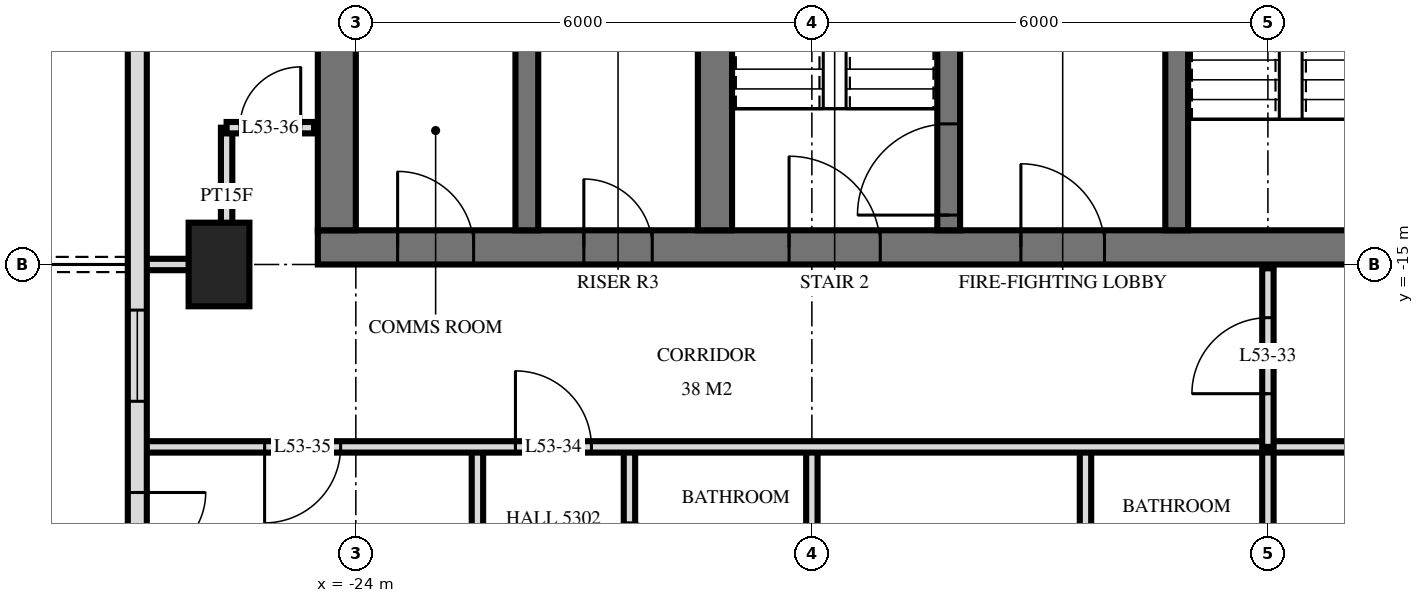
"""IFC4 building model, lengths in metres.
Left out: names, types, materials, properties, quantities, classifications, styles, units other than length and angle.
Written with IfcOpenShell. Run it as: python <this file> out.ifc"""

import sys

from ifc_helpers import new_model, si_unit, direction, frame, frame_2d, origin, origin_2d, place, context, subcontext, project, spatial, rectangle, extrude, element, fill, save


model = new_model("IFC4")
c1 = context("Model", 3, precision=1e-05, world=origin(), true_north=direction((0.0, 1.0)))
c2 = subcontext(c1, "Body", "Model", "MODEL_VIEW")
j1 = project(units=[si_unit("LENGTHUNIT", "METRE"), si_unit("PLANEANGLEUNIT", "RADIAN")], contexts=[c1])
p1 = place(None, origin())
s1 = spatial("IfcSite", under=j1, at=p1, CompositionType="ELEMENT")
p2 = place(p1, origin())
s2 = spatial("IfcBuilding", under=s1, at=p2, CompositionType="ELEMENT")
p3 = place(p2, frame((0.0, 0.0, 204.6)))
s3 = spatial("IfcBuildingStorey", under=s2, at=p3, CompositionType="ELEMENT", Elevation=204.6)
p4 = place(p3, frame((-25.8, -15.0, 0.0), z_axis=(0.0, 0.0, 1.0), x_axis=(0.0, 1.0, 0.0)))
e1 = element("IfcColumn", 1, at=p4, inside=s3, PredefinedType="COLUMN", context=c2, shape_type="SweptSolid", body=[
    extrude(rectangle(XDim=1.1, YDim=0.8, at=origin_2d()), origin(), (0.0, 0.0, 1.0), 3.5),
])
p5 = place(p3, frame((-24.5, -14.775, 0.0), z_axis=(0.0, 0.0, 1.0), x_axis=(1.0, 0.0, 0.0)))
e2 = element("IfcWall", 2, at=p5, inside=s3, PredefinedType="SHEAR", context=c2, shape_type="SweptSolid", body=[
    extrude(rectangle(XDim=14.5, YDim=0.45, at=frame_2d((7.25, 0.0))), origin(), (0.0, 0.0, 1.0), 3.5),
])
p6 = place(p5, frame((6.2, 0.0, 0.0)))
e3 = element("IfcOpeningElement", 3, at=p6, cuts=e2, PredefinedType="OPENING", context=c2, shape_type="SweptSolid", body=[
    extrude(rectangle(XDim=1.2, YDim=2.1, at=frame_2d((0.6, 1.05))), frame((0.0, 0.235, 0.0), z_axis=(0.0, -1.0, 0.0), x_axis=(1.0, 0.0, 0.0)), (0.0, 0.0, 1.0), 0.47),
])
p7 = place(p5, frame((9.25, 0.0, 0.0)))
e4 = element("IfcOpeningElement", 4, at=p7, cuts=e2, PredefinedType="OPENING", context=c2, shape_type="SweptSolid", body=[
    extrude(rectangle(XDim=1.1, YDim=2.1, at=frame_2d((0.55, 1.05))), frame((0.0, 0.235, 0.0), z_axis=(0.0, -1.0, 0.0), x_axis=(1.0, 0.0, 0.0)), (0.0, 0.0, 1.0), 0.47),
])
p8 = place(p5, frame((3.5, 0.0, 0.0)))
e5 = element("IfcOpeningElement", 5, at=p8, cuts=e2, PredefinedType="OPENING", context=c2, shape_type="SweptSolid", body=[
    extrude(rectangle(XDim=0.9, YDim=2.1, at=frame_2d((0.45, 1.05))), frame((0.0, 0.235, 0.0), z_axis=(0.0, -1.0, 0.0), x_axis=(1.0, 0.0, 0.0)), (0.0, 0.0, 1.0), 0.47),
])
p9 = place(p5, frame((1.05, 0.0, 0.0)))
e6 = element("IfcOpeningElement", 6, at=p9, cuts=e2, PredefinedType="OPENING", context=c2, shape_type="SweptSolid", body=[
    extrude(rectangle(XDim=1.0, YDim=2.1, at=frame_2d((0.5, 1.05))), frame((0.0, 0.235, 0.0), z_axis=(0.0, -1.0, 0.0), x_axis=(1.0, 0.0, 0.0)), (0.0, 0.0, 1.0), 0.47),
])
p10 = place(p3, frame((-24.25, -14.55, 0.0), z_axis=(0.0, 0.0, 1.0), x_axis=(0.0, 1.0, 0.0)))
e7 = element("IfcWall", 7, at=p10, inside=s3, PredefinedType="SHEAR", context=c2, shape_type="SweptSolid", body=[
    extrude(rectangle(XDim=14.1, YDim=0.5, at=frame_2d((7.05, 0.0))), origin(), (0.0, 0.0, 1.0), 3.5),
])
p11 = place(p3, frame((-13.2, -14.55, 0.0), z_axis=(0.0, 0.0, 1.0), x_axis=(0.0, 1.0, 0.0)))
e8 = element("IfcWall", 8, at=p11, inside=s3, PredefinedType="SHEAR", context=c2, shape_type="SweptSolid", body=[
    extrude(rectangle(XDim=5.4, YDim=0.3, at=frame_2d((2.7, 0.0))), origin(), (0.0, 0.0, 1.0), 3.5),
])
p12 = place(p11, frame((4.0, 0.0, 0.0)))
e9 = element("IfcOpeningElement", 9, at=p12, cuts=e8, PredefinedType="OPENING", context=c2, shape_type="SweptSolid", body=[
    extrude(rectangle(XDim=1.2, YDim=2.1, at=frame_2d((0.6, 1.05))), frame((0.0, 0.16, 0.0), z_axis=(0.0, -1.0, 0.0), x_axis=(1.0, 0.0, 0.0)), (0.0, 0.0, 1.0), 0.32),
])
p13 = place(p3, frame((-16.2, -14.55, 0.0), z_axis=(0.0, 0.0, 1.0), x_axis=(0.0, 1.0, 0.0)))
e10 = element("IfcWall", 10, at=p13, inside=s3, PredefinedType="SHEAR", context=c2, shape_type="SweptSolid", body=[
    extrude(rectangle(XDim=5.4, YDim=0.3, at=frame_2d((2.7, 0.0))), origin(), (0.0, 0.0, 1.0), 3.5),
])
p14 = place(p13, frame((0.2, 0.0, 0.0)))
e11 = element("IfcOpeningElement", 11, at=p14, cuts=e10, PredefinedType="OPENING", context=c2, shape_type="SweptSolid", body=[
    extrude(rectangle(XDim=1.2, YDim=2.1, at=frame_2d((0.6, 1.05))), frame((0.0, 0.16, 0.0), z_axis=(0.0, -1.0, 0.0), x_axis=(1.0, 0.0, 0.0)), (0.0, 0.0, 1.0), 0.32),
])
p15 = place(p3, frame((-19.275, -14.55, 0.0), z_axis=(0.0, 0.0, 1.0), x_axis=(0.0, 1.0, 0.0)))
e12 = element("IfcWall", 12, at=p15, inside=s3, PredefinedType="SHEAR", context=c2, shape_type="SweptSolid", body=[
    extrude(rectangle(XDim=5.4, YDim=0.45, at=frame_2d((2.7, 0.0))), origin(), (0.0, 0.0, 1.0), 3.5),
])
p16 = place(p3, frame((-21.75, -14.55, 0.0), z_axis=(0.0, 0.0, 1.0), x_axis=(0.0, 1.0, 0.0)))
e13 = element("IfcWall", 13, at=p16, inside=s3, PredefinedType="SHEAR", context=c2, shape_type="SweptSolid", body=[
    extrude(rectangle(XDim=5.4, YDim=0.3, at=frame_2d((2.7, 0.0))), origin(), (0.0, 0.0, 1.0), 3.5),
])
p17 = place(p3, frame((-26.875, -3.325, 0.0), z_axis=(0.0, 0.0, 1.0), x_axis=(0.0, -1.0, 0.0)))
e14 = element("IfcWall", 14, at=p17, inside=s3, PredefinedType="SOLIDWALL", context=c2, shape_type="SweptSolid", body=[
    extrude(rectangle(XDim=21.551, YDim=0.25, at=frame_2d((10.775, 0.0))), origin(), (0.0, 0.0, 1.0), 3.22),
])
p18 = place(p17, frame((6.65, 0.0, 0.0)))
e15 = element("IfcOpeningElement", 15, at=p18, cuts=e14, PredefinedType="OPENING", context=c2, shape_type="SweptSolid", body=[
    extrude(rectangle(XDim=1.8, YDim=2.4, at=frame_2d((0.9, 1.2))), frame((0.0, 0.135, 0.0), z_axis=(0.0, -1.0, 0.0), x_axis=(1.0, 0.0, 0.0)), (0.0, 0.0, 1.0), 0.27),
])
p19 = place(p17, frame((12.275, 0.0, 0.9)))
e16 = element("IfcOpeningElement", 16, at=p19, cuts=e14, PredefinedType="OPENING", context=c2, shape_type="SweptSolid", body=[
    extrude(rectangle(XDim=1.2, YDim=1.5, at=frame_2d((0.6, 0.75))), frame((0.0, 0.135, 0.0), z_axis=(0.0, -1.0, 0.0), x_axis=(1.0, 0.0, 0.0)), (0.0, 0.0, 1.0), 0.27),
])
p20 = place(p17, frame((14.675, 0.0, 0.0)))
e17 = element("IfcOpeningElement", 17, at=p20, cuts=e14, PredefinedType="OPENING", context=c2, shape_type="SweptSolid", body=[
    extrude(rectangle(XDim=1.8, YDim=2.4, at=frame_2d((0.9, 1.2))), frame((0.0, 0.135, 0.0), z_axis=(0.0, -1.0, 0.0), x_axis=(1.0, 0.0, 0.0)), (0.0, 0.0, 1.0), 0.27),
])
p21 = place(p17, frame((18.875, 0.0, 0.0)))
e18 = element("IfcOpeningElement", 18, at=p21, cuts=e14, PredefinedType="OPENING", context=c2, shape_type="SweptSolid", body=[
    extrude(rectangle(XDim=1.8, YDim=2.4, at=frame_2d((0.9, 1.2))), frame((0.0, 0.135, 0.0), z_axis=(0.0, -1.0, 0.0), x_axis=(1.0, 0.0, 0.0)), (0.0, 0.0, 1.0), 0.27),
])
p22 = place(p3, frame((-12.0, -17.4, 0.0), z_axis=(0.0, 0.0, 1.0), x_axis=(0.0, 1.0, 0.0)))
e19 = element("IfcWall", 19, at=p22, inside=s3, PredefinedType="PARTITIONING", context=c2, shape_type="SweptSolid", body=[
    extrude(rectangle(XDim=2.35, YDim=0.15, at=frame_2d((1.175, 0.0))), origin(), (0.0, 0.0, 1.0), 3.22),
])
p23 = place(p22, frame((0.7, 0.0, 0.0)))
e20 = element("IfcOpeningElement", 20, at=p23, cuts=e19, PredefinedType="OPENING", context=c2, shape_type="SweptSolid", body=[
    extrude(rectangle(XDim=1.0, YDim=2.1, at=frame_2d((0.5, 1.05))), frame((0.0, 0.085, 0.0), z_axis=(0.0, -1.0, 0.0), x_axis=(1.0, 0.0, 0.0)), (0.0, 0.0, 1.0), 0.17),
])
p24 = place(p3, frame((-12.0, -29.22, 0.0), z_axis=(0.0, 0.0, 1.0), x_axis=(0.0, 1.0, 0.0)))
e21 = element("IfcWall", 21, at=p24, inside=s3, PredefinedType="PARTITIONING", context=c2, shape_type="SweptSolid", body=[
    extrude(rectangle(XDim=11.82, YDim=0.15, at=frame_2d((5.91, 0.0))), origin(), (0.0, 0.0, 1.0), 3.22),
])
for number, where, z_axis, x_axis in (
    (22, (-14.4, -20.4, 0.0), (0.0, 0.0, 1.0), (0.0, 1.0, 0.0)),
    (23, (-18.0, -20.4, 0.0), (0.0, 0.0, 1.0), (0.0, 1.0, 0.0)),
):
    element("IfcWall", number, at=place(p3, frame(where, z_axis=z_axis, x_axis=x_axis)), inside=s3, PredefinedType="PARTITIONING", context=c2, shape_type="SweptSolid", body=[
        extrude(rectangle(XDim=3.0, YDim=0.15, at=frame_2d((1.5, 0.0))), origin(), (0.0, 0.0, 1.0), 3.22),
    ])
p25 = place(p3, frame((-20.4, -20.4, 0.0), z_axis=(0.0, 0.0, 1.0), x_axis=(0.0, 1.0, 0.0)))
e24 = element("IfcWall", 24, at=p25, inside=s3, PredefinedType="PARTITIONING", context=c2, shape_type="SweptSolid", body=[
    extrude(rectangle(XDim=3.0, YDim=0.15, at=frame_2d((1.5, 0.0))), origin(), (0.0, 0.0, 1.0), 3.22),
])
p26 = place(p25, frame((1.0, 0.0, 0.0)))
e25 = element("IfcOpeningElement", 25, at=p26, cuts=e24, PredefinedType="OPENING", context=c2, shape_type="SweptSolid", body=[
    extrude(rectangle(XDim=1.0, YDim=2.1, at=frame_2d((0.5, 1.05))), frame((0.0, 0.085, 0.0), z_axis=(0.0, -1.0, 0.0), x_axis=(1.0, 0.0, 0.0)), (0.0, 0.0, 1.0), 0.17),
])
p27 = place(p3, frame((-22.4, -20.4, 0.0), z_axis=(0.0, 0.0, 1.0), x_axis=(0.0, 1.0, 0.0)))
e26 = element("IfcWall", 26, at=p27, inside=s3, PredefinedType="PARTITIONING", context=c2, shape_type="SweptSolid", body=[
    extrude(rectangle(XDim=3.0, YDim=0.15, at=frame_2d((1.5, 0.0))), origin(), (0.0, 0.0, 1.0), 3.22),
])
p28 = place(p3, frame((-25.7, -15.0, 0.0), z_axis=(0.0, 0.0, 1.0), x_axis=(0.0, 1.0, 0.0)))
e27 = element("IfcWall", 27, at=p28, inside=s3, PredefinedType="PARTITIONING", context=c2, shape_type="SweptSolid", body=[
    extrude(rectangle(XDim=1.8, YDim=0.15, at=frame_2d((0.9, 0.0))), origin(), (0.0, 0.0, 1.0), 3.22),
])
p29 = place(p3, frame((-26.82, -17.4, 0.0), z_axis=(0.0, 0.0, 1.0), x_axis=(1.0, 0.0, 0.0)))
e28 = element("IfcWall", 28, at=p29, inside=s3, PredefinedType="PARTITIONING", context=c2, shape_type="SweptSolid", body=[
    extrude(rectangle(XDim=53.64, YDim=0.15, at=frame_2d((26.82, 0.0))), origin(), (0.0, 0.0, 1.0), 3.22),
])
p30 = place(p29, frame((4.92, 0.0, 0.0)))
e29 = element("IfcOpeningElement", 29, at=p30, cuts=e28, PredefinedType="OPENING", context=c2, shape_type="SweptSolid", body=[
    extrude(rectangle(XDim=1.0, YDim=2.1, at=frame_2d((0.5, 1.05))), frame((0.0, 0.085, 0.0), z_axis=(0.0, -1.0, 0.0), x_axis=(1.0, 0.0, 0.0)), (0.0, 0.0, 1.0), 0.17),
])
p31 = place(p29, frame((1.62, 0.0, 0.0)))
e30 = element("IfcOpeningElement", 30, at=p31, cuts=e28, PredefinedType="OPENING", context=c2, shape_type="SweptSolid", body=[
    extrude(rectangle(XDim=1.0, YDim=2.1, at=frame_2d((0.5, 1.05))), frame((0.0, 0.085, 0.0), z_axis=(0.0, -1.0, 0.0), x_axis=(1.0, 0.0, 0.0)), (0.0, 0.0, 1.0), 0.17),
])
p32 = place(p29, frame((41.17, 0.0, 0.0)))
e31 = element("IfcOpeningElement", 31, at=p32, cuts=e28, PredefinedType="OPENING", context=c2, shape_type="SweptSolid", body=[
    extrude(rectangle(XDim=1.0, YDim=2.1, at=frame_2d((0.5, 1.05))), frame((0.0, 0.085, 0.0), z_axis=(0.0, -1.0, 0.0), x_axis=(1.0, 0.0, 0.0)), (0.0, 0.0, 1.0), 0.17),
])
p33 = place(p29, frame((49.42, 0.0, 0.0)))
e32 = element("IfcOpeningElement", 32, at=p33, cuts=e28, PredefinedType="OPENING", context=c2, shape_type="SweptSolid", body=[
    extrude(rectangle(XDim=1.0, YDim=2.1, at=frame_2d((0.5, 1.05))), frame((0.0, 0.085, 0.0), z_axis=(0.0, -1.0, 0.0), x_axis=(1.0, 0.0, 0.0)), (0.0, 0.0, 1.0), 0.17),
])
p34 = place(p29, frame((47.62, 0.0, 0.0)))
e33 = element("IfcOpeningElement", 33, at=p34, cuts=e28, PredefinedType="OPENING", context=c2, shape_type="SweptSolid", body=[
    extrude(rectangle(XDim=1.0, YDim=2.1, at=frame_2d((0.5, 1.05))), frame((0.0, 0.085, 0.0), z_axis=(0.0, -1.0, 0.0), x_axis=(1.0, 0.0, 0.0)), (0.0, 0.0, 1.0), 0.17),
])
p35 = place(p29, frame((21.82, 0.0, 0.0)))
e34 = element("IfcOpeningElement", 34, at=p35, cuts=e28, PredefinedType="OPENING", context=c2, shape_type="SweptSolid", body=[
    extrude(rectangle(XDim=1.0, YDim=2.1, at=frame_2d((0.5, 1.05))), frame((0.0, 0.085, 0.0), z_axis=(0.0, -1.0, 0.0), x_axis=(1.0, 0.0, 0.0)), (0.0, 0.0, 1.0), 0.17),
])
p36 = place(p29, frame((33.82, 0.0, 0.0)))
e35 = element("IfcOpeningElement", 35, at=p36, cuts=e28, PredefinedType="OPENING", context=c2, shape_type="SweptSolid", body=[
    extrude(rectangle(XDim=1.0, YDim=2.1, at=frame_2d((0.5, 1.05))), frame((0.0, 0.085, 0.0), z_axis=(0.0, -1.0, 0.0), x_axis=(1.0, 0.0, 0.0)), (0.0, 0.0, 1.0), 0.17),
])
p37 = place(p3, frame((-26.82, -15.0, 0.0), z_axis=(0.0, 0.0, 1.0), x_axis=(1.0, 0.0, 0.0)))
e36 = element("IfcWall", 36, at=p37, inside=s3, PredefinedType="PARTITIONING", context=c2, shape_type="SweptSolid", body=[
    extrude(rectangle(XDim=1.12, YDim=0.15, at=frame_2d((0.56, 0.0))), origin(), (0.0, 0.0, 1.0), 3.22),
])
p38 = place(p3, frame((-25.7, -13.2, 0.0), z_axis=(0.0, 0.0, 1.0), x_axis=(1.0, 0.0, 0.0)))
e37 = element("IfcWall", 37, at=p38, inside=s3, PredefinedType="PARTITIONING", context=c2, shape_type="SweptSolid", body=[
    extrude(rectangle(XDim=1.15, YDim=0.15, at=frame_2d((0.575, 0.0))), origin(), (0.0, 0.0, 1.0), 3.22),
])
p39 = place(p38, frame((0.175, 0.0, 0.0)))
e38 = element("IfcOpeningElement", 38, at=p39, cuts=e37, PredefinedType="OPENING", context=c2, shape_type="SweptSolid", body=[
    extrude(rectangle(XDim=0.8, YDim=2.1, at=frame_2d((0.4, 1.05))), frame((0.0, 0.085, 0.0), z_axis=(0.0, -1.0, 0.0), x_axis=(1.0, 0.0, 0.0)), (0.0, 0.0, 1.0), 0.17),
])
p40 = place(p19, origin())
e39 = element("IfcWindow", 39, at=p40, inside=s3, PartitioningType="SINGLE_PANEL", PredefinedType="WINDOW", context=c2, shape_type="SweptSolid", body=[
    extrude(rectangle(XDim=1.2, YDim=1.5, at=frame_2d((0.6, 0.75))), frame((0.0, 0.03, 0.0), z_axis=(0.0, -1.0, 0.0), x_axis=(1.0, 0.0, 0.0)), (0.0, 0.0, 1.0), 0.06),
])
fill(e16, e39)
p41 = place(p20, origin())
e40 = element("IfcDoor", 40, at=p41, inside=s3, OperationType="DOUBLE_DOOR_SINGLE_SWING", PredefinedType="DOOR", context=c2, shape_type="SweptSolid", body=[
    extrude(rectangle(XDim=1.8, YDim=2.4, at=frame_2d((0.9, 1.2))), frame((0.0, 0.025, 0.0), z_axis=(0.0, -1.0, 0.0), x_axis=(1.0, 0.0, 0.0)), (0.0, 0.0, 1.0), 0.05),
])
fill(e17, e40)
p42 = place(p6, origin())
e41 = element("IfcDoor", 41, at=p42, inside=s3, OperationType="SINGLE_SWING_RIGHT", PredefinedType="DOOR", context=c2, shape_type="SweptSolid", body=[
    extrude(rectangle(XDim=1.2, YDim=2.1, at=frame_2d((0.6, 1.05))), frame((0.0, 0.025, 0.0), z_axis=(0.0, -1.0, 0.0), x_axis=(1.0, 0.0, 0.0)), (0.0, 0.0, 1.0), 0.05),
])
fill(e3, e41)
p43 = place(p7, origin())
e42 = element("IfcDoor", 42, at=p43, inside=s3, OperationType="SINGLE_SWING_RIGHT", PredefinedType="DOOR", context=c2, shape_type="SweptSolid", body=[
    extrude(rectangle(XDim=1.1, YDim=2.1, at=frame_2d((0.55, 1.05))), frame((0.0, 0.025, 0.0), z_axis=(0.0, -1.0, 0.0), x_axis=(1.0, 0.0, 0.0)), (0.0, 0.0, 1.0), 0.05),
])
fill(e4, e42)
p44 = place(p8, origin())
e43 = element("IfcDoor", 43, at=p44, inside=s3, OperationType="SINGLE_SWING_RIGHT", PredefinedType="DOOR", context=c2, shape_type="SweptSolid", body=[
    extrude(rectangle(XDim=0.9, YDim=2.1, at=frame_2d((0.45, 1.05))), frame((0.0, 0.025, 0.0), z_axis=(0.0, -1.0, 0.0), x_axis=(1.0, 0.0, 0.0)), (0.0, 0.0, 1.0), 0.05),
])
fill(e5, e43)
p45 = place(p9, origin())
e44 = element("IfcDoor", 44, at=p45, inside=s3, OperationType="SINGLE_SWING_RIGHT", PredefinedType="DOOR", context=c2, shape_type="SweptSolid", body=[
    extrude(rectangle(XDim=1.0, YDim=2.1, at=frame_2d((0.5, 1.05))), frame((0.0, 0.025, 0.0), z_axis=(0.0, -1.0, 0.0), x_axis=(1.0, 0.0, 0.0)), (0.0, 0.0, 1.0), 0.05),
])
fill(e6, e44)
p46 = place(p14, origin())
e45 = element("IfcDoor", 45, at=p46, inside=s3, OperationType="SINGLE_SWING_RIGHT", PredefinedType="DOOR", context=c2, shape_type="SweptSolid", body=[
    extrude(rectangle(XDim=1.2, YDim=2.1, at=frame_2d((0.6, 1.05))), frame((0.0, 0.025, 0.0), z_axis=(0.0, -1.0, 0.0), x_axis=(1.0, 0.0, 0.0)), (0.0, 0.0, 1.0), 0.05),
])
fill(e11, e45)
p47 = place(p23, origin())
e46 = element("IfcDoor", 46, at=p47, inside=s3, OperationType="SINGLE_SWING_RIGHT", PredefinedType="DOOR", context=c2, shape_type="SweptSolid", body=[
    extrude(rectangle(XDim=1.0, YDim=2.1, at=frame_2d((0.5, 1.05))), frame((0.0, 0.025, 0.0), z_axis=(0.0, -1.0, 0.0), x_axis=(1.0, 0.0, 0.0)), (0.0, 0.0, 1.0), 0.05),
])
fill(e20, e46)
p48 = place(p30, origin())
e47 = element("IfcDoor", 47, at=p48, inside=s3, OperationType="SINGLE_SWING_RIGHT", PredefinedType="DOOR", context=c2, shape_type="SweptSolid", body=[
    extrude(rectangle(XDim=1.0, YDim=2.1, at=frame_2d((0.5, 1.05))), frame((0.0, 0.025, 0.0), z_axis=(0.0, -1.0, 0.0), x_axis=(1.0, 0.0, 0.0)), (0.0, 0.0, 1.0), 0.05),
])
fill(e29, e47)
p49 = place(p31, frame((0.5, 0.0, 0.0), z_axis=(0.0, 0.0, 1.0), x_axis=(-1.0, 0.0, 0.0)))
e48 = element("IfcDoor", 48, at=p49, inside=s3, OperationType="SINGLE_SWING_LEFT", PredefinedType="DOOR", context=c2, shape_type="SweptSolid", body=[
    extrude(rectangle(XDim=1.0, YDim=2.1, at=frame_2d((0.0, 1.05))), frame((0.0, -0.025, 0.0), z_axis=(0.0, 1.0, 0.0), x_axis=(-1.0, 0.0, 0.0)), (0.0, 0.0, 1.0), 0.05),
])
fill(e30, e48)
p50 = place(p39, origin())
e49 = element("IfcDoor", 49, at=p50, inside=s3, OperationType="SINGLE_SWING_LEFT", PredefinedType="DOOR", context=c2, shape_type="SweptSolid", body=[
    extrude(rectangle(XDim=0.8, YDim=2.1, at=frame_2d((0.4, 1.05))), frame((0.0, 0.025, 0.0), z_axis=(0.0, -1.0, 0.0), x_axis=(1.0, 0.0, 0.0)), (0.0, 0.0, 1.0), 0.05),
])
fill(e38, e49)
save(model, sys.argv[1])
